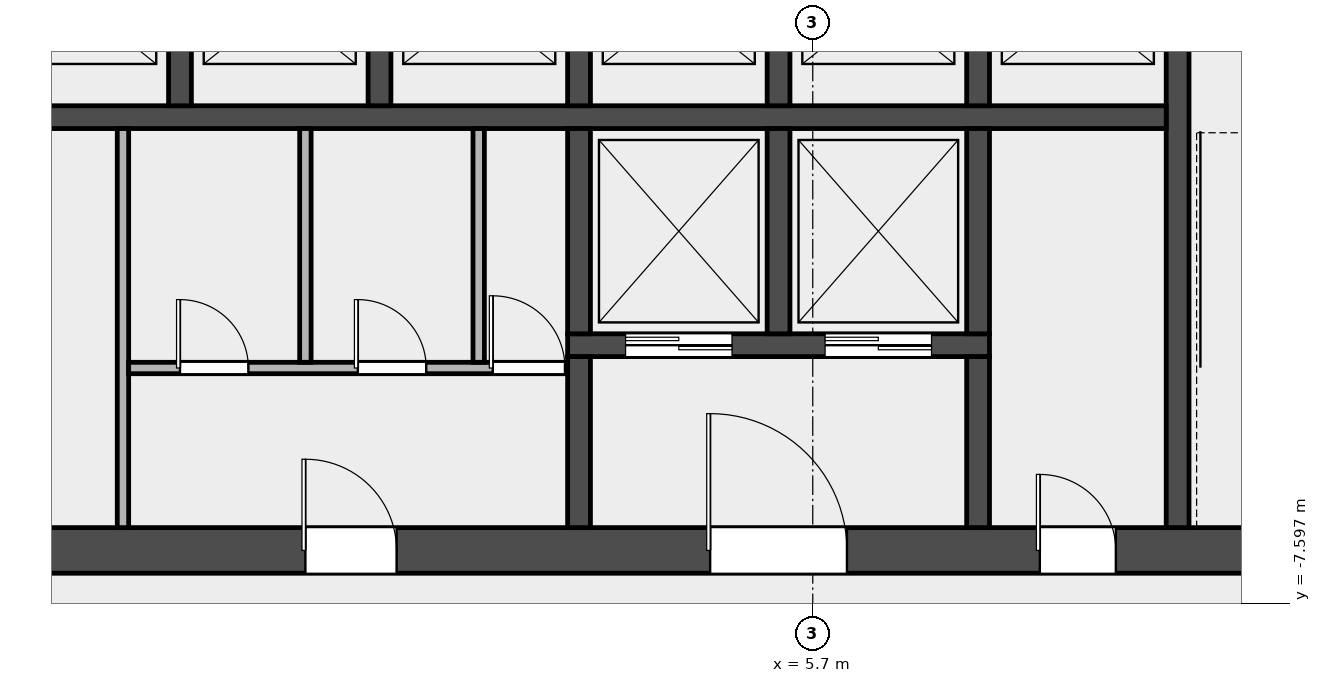
"""IFC4 building model, lengths in metres.
Left out: names, types, materials, properties, quantities, classifications, styles, units other than length and angle.
Written with IfcOpenShell. Run it as: python <this file> out.ifc"""

import sys

from ifc_helpers import new_model, si_unit, direction, frame, frame_2d, origin, place, context, subcontext, project, spatial, rectangle, extrude, element, fill, save


model = new_model("IFC4")
c1 = context("Model", 3, precision=1e-05, world=origin(), true_north=direction((0.0, 1.0)))
c2 = subcontext(c1, "Body", "Model", "MODEL_VIEW")
j1 = project(units=[si_unit("LENGTHUNIT", "METRE"), si_unit("PLANEANGLEUNIT", "RADIAN")], contexts=[c1])
p1 = place(None, origin())
s1 = spatial("IfcSite", under=j1, at=p1, CompositionType="ELEMENT")
p2 = place(p1, origin())
s2 = spatial("IfcBuilding", under=s1, at=p2, CompositionType="ELEMENT")
p3 = place(p2, frame((0.0, 0.0, 169.0)))
s3 = spatial("IfcBuildingStorey", under=s2, at=p3, CompositionType="ELEMENT", Elevation=169.0)
p4 = place(p3, frame((-14.4, -6.9, 0.0), z_axis=(0.0, 0.0, 1.0), x_axis=(1.0, 0.0, 0.0)))
e1 = element("IfcWall", 1, at=p4, inside=s3, PredefinedType="SHEAR", context=c2, shape_type="SweptSolid", body=[
    extrude(rectangle(XDim=28.8, YDim=0.6, at=frame_2d((14.4, 0.0))), origin(), (0.0, 0.0, 1.0), 3.7),
])
p5 = place(p4, frame((5.275, 0.0, 0.0)))
e2 = element("IfcOpeningElement", 2, at=p5, cuts=e1, PredefinedType="OPENING", context=c2, shape_type="SweptSolid", body=[
    extrude(rectangle(XDim=1.0, YDim=2.1, at=frame_2d((0.5, 1.05))), frame((0.0, 0.312, 0.0), z_axis=(0.0, -1.0, 0.0), x_axis=(1.0, 0.0, 0.0)), (0.0, 0.0, 1.0), 0.624),
])
p6 = place(p4, frame((8.837, 0.0, 0.0)))
e3 = element("IfcOpeningElement", 3, at=p6, cuts=e1, PredefinedType="OPENING", context=c2, shape_type="SweptSolid", body=[
    extrude(rectangle(XDim=1.0, YDim=2.1, at=frame_2d((0.5, 1.05))), frame((0.0, 0.312, 0.0), z_axis=(0.0, -1.0, 0.0), x_axis=(1.0, 0.0, 0.0)), (0.0, 0.0, 1.0), 0.624),
])
p7 = place(p4, frame((13.425, 0.0, 0.0)))
e4 = element("IfcOpeningElement", 4, at=p7, cuts=e1, PredefinedType="OPENING", context=c2, shape_type="SweptSolid", body=[
    extrude(rectangle(XDim=1.2, YDim=2.1, at=frame_2d((0.6, 1.05))), frame((0.0, 0.312, 0.0), z_axis=(0.0, -1.0, 0.0), x_axis=(1.0, 0.0, 0.0)), (0.0, 0.0, 1.0), 0.624),
])
p8 = place(p4, frame((18.75, 0.0, 0.0)))
e5 = element("IfcOpeningElement", 5, at=p8, cuts=e1, PredefinedType="OPENING", context=c2, shape_type="SweptSolid", body=[
    extrude(rectangle(XDim=1.8, YDim=2.1, at=frame_2d((0.9, 1.05))), frame((0.0, 0.312, 0.0), z_axis=(0.0, -1.0, 0.0), x_axis=(1.0, 0.0, 0.0)), (0.0, 0.0, 1.0), 0.624),
])
p9 = place(p4, frame((23.087, 0.0, 0.0)))
e6 = element("IfcOpeningElement", 6, at=p9, cuts=e1, PredefinedType="OPENING", context=c2, shape_type="SweptSolid", body=[
    extrude(rectangle(XDim=1.0, YDim=2.1, at=frame_2d((0.5, 1.05))), frame((0.0, 0.312, 0.0), z_axis=(0.0, -1.0, 0.0), x_axis=(1.0, 0.0, 0.0)), (0.0, 0.0, 1.0), 0.624),
])
p10 = place(p3, frame((10.5, -6.6, 0.0), z_axis=(0.0, 0.0, 1.0), x_axis=(0.0, 1.0, 0.0)))
e7 = element("IfcWall", 7, at=p10, inside=s3, PredefinedType="SHEAR", context=c2, shape_type="SweptSolid", body=[
    extrude(rectangle(XDim=8.55, YDim=0.3, at=frame_2d((4.275, 0.0))), origin(), (0.0, 0.0, 1.0), 3.7),
])
p11 = place(p3, frame((-10.35, -1.2, 0.0), z_axis=(0.0, 0.0, 1.0), x_axis=(1.0, 0.0, 0.0)))
e8 = element("IfcWall", 8, at=p11, inside=s3, PredefinedType="SOLIDWALL", context=c2, shape_type="SweptSolid", body=[
    extrude(rectangle(XDim=20.7, YDim=0.3, at=frame_2d((10.35, 0.0))), origin(), (0.0, 0.0, 1.0), 3.7),
])
for number, where, z_axis, x_axis in (
    (9, (-2.625, -1.05, 0.0), (0.0, 0.0, 1.0), (0.0, 1.0, 0.0)),
    (10, (0.0, -1.05, 0.0), (0.0, 0.0, 1.0), (0.0, 1.0, 0.0)),
    (11, (2.625, -1.05, 0.0), (0.0, 0.0, 1.0), (0.0, 1.0, 0.0)),
    (12, (5.25, -1.05, 0.0), (0.0, 0.0, 1.0), (0.0, 1.0, 0.0)),
    (13, (7.875, -1.05, 0.0), (0.0, 0.0, 1.0), (0.0, 1.0, 0.0)),
):
    element("IfcWall", number, at=place(p3, frame(where, z_axis=z_axis, x_axis=x_axis)), inside=s3, PredefinedType="SOLIDWALL", context=c2, shape_type="SweptSolid", body=[
        extrude(rectangle(XDim=2.7, YDim=0.3, at=frame_2d((1.35, 0.0))), origin(), (0.0, 0.0, 1.0), 3.7),
    ])
p12 = place(p3, frame((2.475, -4.2, 0.0), z_axis=(0.0, 0.0, 1.0), x_axis=(1.0, 0.0, 0.0)))
e14 = element("IfcWall", 14, at=p12, inside=s3, PredefinedType="SOLIDWALL", context=c2, shape_type="SweptSolid", body=[
    extrude(rectangle(XDim=5.55, YDim=0.3, at=frame_2d((2.775, 0.0))), origin(), (0.0, 0.0, 1.0), 3.7),
])
p13 = place(p12, frame((0.762, 0.0, 0.0)))
e15 = element("IfcOpeningElement", 15, at=p13, cuts=e14, PredefinedType="OPENING", context=c2, shape_type="SweptSolid", body=[
    extrude(rectangle(XDim=1.4, YDim=2.1, at=frame_2d((0.7, 1.05))), frame((0.0, 0.162, 0.0), z_axis=(0.0, -1.0, 0.0), x_axis=(1.0, 0.0, 0.0)), (0.0, 0.0, 1.0), 0.324),
])
p14 = place(p12, frame((3.387, 0.0, 0.0)))
e16 = element("IfcOpeningElement", 16, at=p14, cuts=e14, PredefinedType="OPENING", context=c2, shape_type="SweptSolid", body=[
    extrude(rectangle(XDim=1.4, YDim=2.1, at=frame_2d((0.7, 1.05))), frame((0.0, 0.162, 0.0), z_axis=(0.0, -1.0, 0.0), x_axis=(1.0, 0.0, 0.0)), (0.0, 0.0, 1.0), 0.324),
])
p15 = place(p3, frame((2.625, -4.05, 0.0), z_axis=(0.0, 0.0, 1.0), x_axis=(0.0, 1.0, 0.0)))
e17 = element("IfcWall", 17, at=p15, inside=s3, PredefinedType="SOLIDWALL", context=c2, shape_type="SweptSolid", body=[
    extrude(rectangle(XDim=2.7, YDim=0.3, at=frame_2d((1.35, 0.0))), origin(), (0.0, 0.0, 1.0), 3.7),
])
p16 = place(p3, frame((2.625, -6.6, 0.0), z_axis=(0.0, 0.0, 1.0), x_axis=(0.0, 1.0, 0.0)))
e18 = element("IfcWall", 18, at=p16, inside=s3, PredefinedType="SOLIDWALL", context=c2, shape_type="SweptSolid", body=[
    extrude(rectangle(XDim=2.25, YDim=0.3, at=frame_2d((1.125, 0.0))), origin(), (0.0, 0.0, 1.0), 3.7),
])
for number, where, z_axis, x_axis in (
    (19, (5.25, -4.05, 0.0), (0.0, 0.0, 1.0), (0.0, 1.0, 0.0)),
    (20, (7.875, -4.05, 0.0), (0.0, 0.0, 1.0), (0.0, 1.0, 0.0)),
):
    element("IfcWall", number, at=place(p3, frame(where, z_axis=z_axis, x_axis=x_axis)), inside=s3, PredefinedType="SOLIDWALL", context=c2, shape_type="SweptSolid", body=[
        extrude(rectangle(XDim=2.7, YDim=0.3, at=frame_2d((1.35, 0.0))), origin(), (0.0, 0.0, 1.0), 3.7),
    ])
p17 = place(p3, frame((7.875, -6.6, 0.0), z_axis=(0.0, 0.0, 1.0), x_axis=(0.0, 1.0, 0.0)))
e21 = element("IfcWall", 21, at=p17, inside=s3, PredefinedType="SOLIDWALL", context=c2, shape_type="SweptSolid", body=[
    extrude(rectangle(XDim=2.25, YDim=0.3, at=frame_2d((1.125, 0.0))), origin(), (0.0, 0.0, 1.0), 3.7),
])
p18 = place(p3, frame((-3.375, -6.6, 0.0), z_axis=(0.0, 0.0, 1.0), x_axis=(0.0, 1.0, 0.0)))
e22 = element("IfcWall", 22, at=p18, inside=s3, PredefinedType="PARTITIONING", context=c2, shape_type="SweptSolid", body=[
    extrude(rectangle(XDim=5.25, YDim=0.15, at=frame_2d((2.625, 0.0))), origin(), (0.0, 0.0, 1.0), 3.7),
])
p19 = place(p3, frame((-3.3, -4.5, 0.0), z_axis=(0.0, 0.0, 1.0), x_axis=(1.0, 0.0, 0.0)))
e23 = element("IfcWall", 23, at=p19, inside=s3, PredefinedType="PARTITIONING", context=c2, shape_type="SweptSolid", body=[
    extrude(rectangle(XDim=5.775, YDim=0.15, at=frame_2d((2.888, 0.0))), origin(), (0.0, 0.0, 1.0), 3.7),
])
p20 = place(p19, frame((0.675, 0.0, 0.0)))
e24 = element("IfcOpeningElement", 24, at=p20, cuts=e23, PredefinedType="OPENING", context=c2, shape_type="SweptSolid", body=[
    extrude(rectangle(XDim=0.9, YDim=2.1, at=frame_2d((0.45, 1.05))), frame((0.0, 0.087, 0.0), z_axis=(0.0, -1.0, 0.0), x_axis=(1.0, 0.0, 0.0)), (0.0, 0.0, 1.0), 0.174),
])
p21 = place(p19, frame((3.015, 0.0, 0.0)))
e25 = element("IfcOpeningElement", 25, at=p21, cuts=e23, PredefinedType="OPENING", context=c2, shape_type="SweptSolid", body=[
    extrude(rectangle(XDim=0.9, YDim=2.1, at=frame_2d((0.45, 1.05))), frame((0.0, 0.087, 0.0), z_axis=(0.0, -1.0, 0.0), x_axis=(1.0, 0.0, 0.0)), (0.0, 0.0, 1.0), 0.174),
])
p22 = place(p19, frame((4.79, 0.0, 0.0)))
e26 = element("IfcOpeningElement", 26, at=p22, cuts=e23, PredefinedType="OPENING", context=c2, shape_type="SweptSolid", body=[
    extrude(rectangle(XDim=0.95, YDim=2.1, at=frame_2d((0.475, 1.05))), frame((0.0, 0.087, 0.0), z_axis=(0.0, -1.0, 0.0), x_axis=(1.0, 0.0, 0.0)), (0.0, 0.0, 1.0), 0.174),
])
for number, where, z_axis, x_axis in (
    (27, (-0.975, -4.425, 0.0), (0.0, 0.0, 1.0), (0.0, 1.0, 0.0)),
    (28, (1.305, -4.425, 0.0), (0.0, 0.0, 1.0), (0.0, 1.0, 0.0)),
):
    element("IfcWall", number, at=place(p3, frame(where, z_axis=z_axis, x_axis=x_axis)), inside=s3, PredefinedType="PARTITIONING", context=c2, shape_type="SweptSolid", body=[
        extrude(rectangle(XDim=3.075, YDim=0.15, at=frame_2d((1.538, 0.0))), origin(), (0.0, 0.0, 1.0), 3.7),
    ])
p23 = place(p13, origin())
e29 = element("IfcDoor", 29, at=p23, inside=s3, OperationType="DOUBLE_DOOR_SLIDING", PredefinedType="DOOR", context=c2, shape_type="SweptSolid", body=[
    extrude(rectangle(XDim=1.4, YDim=2.1, at=frame_2d((0.7, 1.05))), frame((0.0, 0.025, 0.0), z_axis=(0.0, -1.0, 0.0), x_axis=(1.0, 0.0, 0.0)), (0.0, 0.0, 1.0), 0.05),
])
fill(e15, e29)
p24 = place(p14, origin())
e30 = element("IfcDoor", 30, at=p24, inside=s3, OperationType="DOUBLE_DOOR_SLIDING", PredefinedType="DOOR", context=c2, shape_type="SweptSolid", body=[
    extrude(rectangle(XDim=1.4, YDim=2.1, at=frame_2d((0.7, 1.05))), frame((0.0, 0.025, 0.0), z_axis=(0.0, -1.0, 0.0), x_axis=(1.0, 0.0, 0.0)), (0.0, 0.0, 1.0), 0.05),
])
fill(e16, e30)
p25 = place(p7, origin())
e31 = element("IfcDoor", 31, at=p25, inside=s3, OperationType="SINGLE_SWING_LEFT", PredefinedType="DOOR", context=c2, shape_type="SweptSolid", body=[
    extrude(rectangle(XDim=1.2, YDim=2.1, at=frame_2d((0.6, 1.05))), frame((0.0, 0.025, 0.0), z_axis=(0.0, -1.0, 0.0), x_axis=(1.0, 0.0, 0.0)), (0.0, 0.0, 1.0), 0.05),
])
fill(e4, e31)
p26 = place(p20, origin())
e32 = element("IfcDoor", 32, at=p26, inside=s3, OperationType="SINGLE_SWING_LEFT", PredefinedType="DOOR", context=c2, shape_type="SweptSolid", body=[
    extrude(rectangle(XDim=0.9, YDim=2.1, at=frame_2d((0.45, 1.05))), frame((0.0, 0.025, 0.0), z_axis=(0.0, -1.0, 0.0), x_axis=(1.0, 0.0, 0.0)), (0.0, 0.0, 1.0), 0.05),
])
fill(e24, e32)
p27 = place(p21, origin())
e33 = element("IfcDoor", 33, at=p27, inside=s3, OperationType="SINGLE_SWING_LEFT", PredefinedType="DOOR", context=c2, shape_type="SweptSolid", body=[
    extrude(rectangle(XDim=0.9, YDim=2.1, at=frame_2d((0.45, 1.05))), frame((0.0, 0.025, 0.0), z_axis=(0.0, -1.0, 0.0), x_axis=(1.0, 0.0, 0.0)), (0.0, 0.0, 1.0), 0.05),
])
fill(e25, e33)
p28 = place(p22, origin())
e34 = element("IfcDoor", 34, at=p28, inside=s3, OperationType="SINGLE_SWING_LEFT", PredefinedType="DOOR", context=c2, shape_type="SweptSolid", body=[
    extrude(rectangle(XDim=0.95, YDim=2.1, at=frame_2d((0.475, 1.05))), frame((0.0, 0.025, 0.0), z_axis=(0.0, -1.0, 0.0), x_axis=(1.0, 0.0, 0.0)), (0.0, 0.0, 1.0), 0.05),
])
fill(e26, e34)
p29 = place(p8, origin())
e35 = element("IfcDoor", 35, at=p29, inside=s3, OperationType="DOUBLE_DOOR_SINGLE_SWING", PredefinedType="DOOR", context=c2, shape_type="SweptSolid", body=[
    extrude(rectangle(XDim=1.8, YDim=2.1, at=frame_2d((0.9, 1.05))), frame((0.0, 0.025, 0.0), z_axis=(0.0, -1.0, 0.0), x_axis=(1.0, 0.0, 0.0)), (0.0, 0.0, 1.0), 0.05),
])
fill(e5, e35)
p30 = place(p9, origin())
e36 = element("IfcDoor", 36, at=p30, inside=s3, OperationType="SINGLE_SWING_LEFT", PredefinedType="DOOR", context=c2, shape_type="SweptSolid", body=[
    extrude(rectangle(XDim=1.0, YDim=2.1, at=frame_2d((0.5, 1.05))), frame((0.0, 0.025, 0.0), z_axis=(0.0, -1.0, 0.0), x_axis=(1.0, 0.0, 0.0)), (0.0, 0.0, 1.0), 0.05),
])
fill(e6, e36)
save(model, sys.argv[1])
